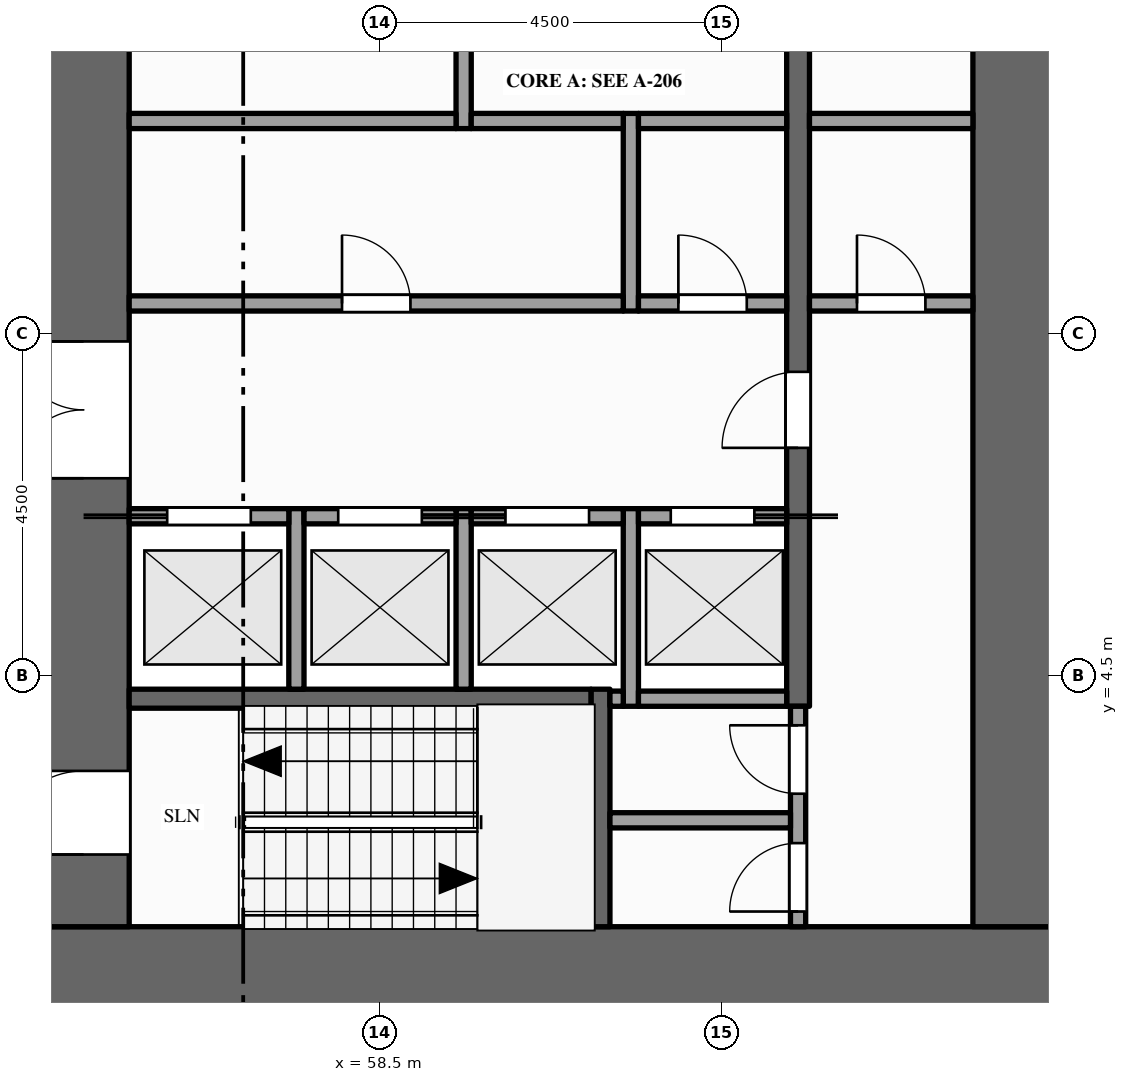
"""IFC4 building model, lengths in metres.
Left out: names, types, materials, properties, quantities, classifications, styles, units other than length and angle.
Written with IfcOpenShell. Run it as: python <this file> out.ifc"""

import sys

from ifc_helpers import new_model, si_unit, direction, frame, frame_2d, origin, place, context, subcontext, project, spatial, rectangle, extrude, element, fill, save


model = new_model("IFC4")
c1 = context("Model", 3, precision=1e-05, world=origin(), true_north=direction((0.0, 1.0)))
c2 = subcontext(c1, "Body", "Model", "MODEL_VIEW")
j1 = project(units=[si_unit("LENGTHUNIT", "METRE"), si_unit("PLANEANGLEUNIT", "RADIAN")], contexts=[c1])
p1 = place(None, origin())
s1 = spatial("IfcSite", under=j1, at=p1, CompositionType="ELEMENT")
p2 = place(p1, origin())
s2 = spatial("IfcBuilding", under=s1, at=p2, CompositionType="ELEMENT")
p3 = place(p2, frame((0.0, 0.0, 29.0)))
s3 = spatial("IfcBuildingStorey", under=s2, at=p3, CompositionType="ELEMENT", Elevation=29.0)
p4 = place(p3, frame((67.5, 0.6, -0.15), z_axis=(0.0, 0.0, 1.0), x_axis=(-1.0, 0.0, 0.0)))
e1 = element("IfcWall", 1, at=p4, inside=s3, PredefinedType="SHEAR", context=c2, shape_type="SweptSolid", body=[
    extrude(rectangle(XDim=13.5, YDim=1.2, at=frame_2d((6.75, 0.0))), origin(), (0.0, 0.0, 1.0), 4.0),
])
p5 = place(p3, frame((54.6, 1.2, -0.15), z_axis=(0.0, 0.0, 1.0), x_axis=(0.0, 1.0, 0.0)))
e2 = element("IfcWall", 2, at=p5, inside=s3, PredefinedType="SHEAR", context=c2, shape_type="SweptSolid", body=[
    extrude(rectangle(XDim=20.1, YDim=1.2, at=frame_2d((10.05, 0.0))), origin(), (0.0, 0.0, 1.0), 4.0),
])
p6 = place(p5, frame((5.9, 0.0, 0.15)))
e3 = element("IfcOpeningElement", 3, at=p6, cuts=e2, PredefinedType="OPENING", context=c2, shape_type="SweptSolid", body=[
    extrude(rectangle(XDim=1.8, YDim=2.1, at=frame_2d((0.9, 1.05))), frame((0.0, 0.61, 0.0), z_axis=(0.0, -1.0, 0.0), x_axis=(1.0, 0.0, 0.0)), (0.0, 0.0, 1.0), 1.22),
])
p7 = place(p5, frame((11.95, 0.0, 0.15)))
e4 = element("IfcOpeningElement", 4, at=p7, cuts=e2, PredefinedType="OPENING", context=c2, shape_type="SweptSolid", body=[
    extrude(rectangle(XDim=1.1, YDim=2.1, at=frame_2d((0.55, 1.05))), frame((0.0, 0.61, 0.0), z_axis=(0.0, -1.0, 0.0), x_axis=(1.0, 0.0, 0.0)), (0.0, 0.0, 1.0), 1.22),
])
p8 = place(p5, frame((0.95, 0.0, 0.15)))
e5 = element("IfcOpeningElement", 5, at=p8, cuts=e2, PredefinedType="OPENING", context=c2, shape_type="SweptSolid", body=[
    extrude(rectangle(XDim=1.1, YDim=2.1, at=frame_2d((0.55, 1.05))), frame((0.0, 0.61, 0.0), z_axis=(0.0, -1.0, 0.0), x_axis=(1.0, 0.0, 0.0)), (0.0, 0.0, 1.0), 1.22),
])
p9 = place(p5, frame((18.15, 0.0, 0.15)))
e6 = element("IfcOpeningElement", 6, at=p9, cuts=e2, PredefinedType="OPENING", context=c2, shape_type="SweptSolid", body=[
    extrude(rectangle(XDim=1.1, YDim=2.1, at=frame_2d((0.55, 1.05))), frame((0.0, 0.61, 0.0), z_axis=(0.0, -1.0, 0.0), x_axis=(1.0, 0.0, 0.0)), (0.0, 0.0, 1.0), 1.22),
])
p10 = place(p3, frame((66.9, 1.2, -0.15), z_axis=(0.0, 0.0, 1.0), x_axis=(0.0, 1.0, 0.0)))
e7 = element("IfcWall", 7, at=p10, inside=s3, PredefinedType="SHEAR", context=c2, shape_type="SweptSolid", body=[
    extrude(rectangle(XDim=20.1, YDim=1.2, at=frame_2d((10.05, 0.0))), origin(), (0.0, 0.0, 1.0), 4.0),
])
for number, where, z_axis, x_axis in (
    (8, (57.4, 4.325, 0.0), (0.0, 0.0, 1.0), (0.0, 1.0, 0.0)),
    (9, (59.6, 4.325, 0.0), (0.0, 0.0, 1.0), (0.0, 1.0, 0.0)),
):
    element("IfcWall", number, at=place(p3, frame(where, z_axis=z_axis, x_axis=x_axis)), inside=s3, PredefinedType="SOLIDWALL", context=c2, shape_type="SweptSolid", body=[
        extrude(rectangle(XDim=2.375, YDim=0.2, at=frame_2d((1.188, 0.0))), origin(), (0.0, 0.0, 1.0), 3.85),
    ])
p11 = place(p3, frame((59.6, 11.7, 0.0), z_axis=(0.0, 0.0, 1.0), x_axis=(0.0, 1.0, 0.0)))
e10 = element("IfcWall", 10, at=p11, inside=s3, PredefinedType="PARTITIONING", context=c2, shape_type="SweptSolid", body=[
    extrude(rectangle(XDim=3.8, YDim=0.2, at=frame_2d((1.9, 0.0))), origin(), (0.0, 0.0, 1.0), 3.85),
])
p12 = place(p11, frame((1.5, 0.0, 0.0)))
e11 = element("IfcOpeningElement", 11, at=p12, cuts=e10, PredefinedType="OPENING", context=c2, shape_type="SweptSolid", body=[
    extrude(rectangle(XDim=1.0, YDim=2.1, at=frame_2d((0.5, 1.05))), frame((0.0, 0.11, 0.0), z_axis=(0.0, -1.0, 0.0), x_axis=(1.0, 0.0, 0.0)), (0.0, 0.0, 1.0), 0.22),
])
p13 = place(p3, frame((61.4, 1.2, 0.0), z_axis=(0.0, 0.0, 1.0), x_axis=(0.0, 1.0, 0.0)))
e12 = element("IfcWall", 12, at=p13, inside=s3, PredefinedType="SHEAR", context=c2, shape_type="SweptSolid", body=[
    extrude(rectangle(XDim=3.125, YDim=0.25, at=frame_2d((1.562, 0.0))), origin(), (0.0, 0.0, 1.0), 3.85),
])
p14 = place(p3, frame((61.8, 4.1, 0.0), z_axis=(0.0, 0.0, 1.0), x_axis=(0.0, 1.0, 0.0)))
e13 = element("IfcWall", 13, at=p14, inside=s3, PredefinedType="SOLIDWALL", context=c2, shape_type="SweptSolid", body=[
    extrude(rectangle(XDim=2.6, YDim=0.2, at=frame_2d((1.3, 0.0))), origin(), (0.0, 0.0, 1.0), 3.85),
])
p15 = place(p3, frame((61.8, 9.3, 0.0), z_axis=(0.0, 0.0, 1.0), x_axis=(0.0, 1.0, 0.0)))
e14 = element("IfcWall", 14, at=p15, inside=s3, PredefinedType="PARTITIONING", context=c2, shape_type="SweptSolid", body=[
    extrude(rectangle(XDim=2.6, YDim=0.2, at=frame_2d((1.3, 0.0))), origin(), (0.0, 0.0, 1.0), 3.85),
])
p16 = place(p3, frame((64.0, 1.2, 0.0), z_axis=(0.0, 0.0, 1.0), x_axis=(0.0, 1.0, 0.0)))
e15 = element("IfcWall", 15, at=p16, inside=s3, PredefinedType="PARTITIONING", context=c2, shape_type="SweptSolid", body=[
    extrude(rectangle(XDim=2.9, YDim=0.2, at=frame_2d((1.45, 0.0))), origin(), (0.0, 0.0, 1.0), 3.85),
])
p17 = place(p16, frame((0.2, 0.0, 0.0)))
e16 = element("IfcOpeningElement", 16, at=p17, cuts=e15, PredefinedType="OPENING", context=c2, shape_type="SweptSolid", body=[
    extrude(rectangle(XDim=0.9, YDim=2.1, at=frame_2d((0.45, 1.05))), frame((0.0, 0.11, 0.0), z_axis=(0.0, -1.0, 0.0), x_axis=(1.0, 0.0, 0.0)), (0.0, 0.0, 1.0), 0.22),
])
p18 = place(p16, frame((1.75, 0.0, 0.0)))
e17 = element("IfcOpeningElement", 17, at=p18, cuts=e15, PredefinedType="OPENING", context=c2, shape_type="SweptSolid", body=[
    extrude(rectangle(XDim=0.9, YDim=2.1, at=frame_2d((0.45, 1.05))), frame((0.0, 0.11, 0.0), z_axis=(0.0, -1.0, 0.0), x_axis=(1.0, 0.0, 0.0)), (0.0, 0.0, 1.0), 0.22),
])
p19 = place(p3, frame((64.0, 4.1, 0.0), z_axis=(0.0, 0.0, 1.0), x_axis=(0.0, 1.0, 0.0)))
e18 = element("IfcWall", 18, at=p19, inside=s3, PredefinedType="SHEAR", context=c2, shape_type="SweptSolid", body=[
    extrude(rectangle(XDim=14.5, YDim=0.3, at=frame_2d((7.25, 0.0))), origin(), (0.0, 0.0, 1.0), 3.85),
])
p20 = place(p19, frame((3.4, 0.0, 0.0)))
e19 = element("IfcOpeningElement", 19, at=p20, cuts=e18, PredefinedType="OPENING", context=c2, shape_type="SweptSolid", body=[
    extrude(rectangle(XDim=1.0, YDim=2.1, at=frame_2d((0.5, 1.05))), frame((0.0, 0.16, 0.0), z_axis=(0.0, -1.0, 0.0), x_axis=(1.0, 0.0, 0.0)), (0.0, 0.0, 1.0), 0.32),
])
p21 = place(p19, frame((9.1, 0.0, 0.0)))
e20 = element("IfcOpeningElement", 20, at=p21, cuts=e18, PredefinedType="OPENING", context=c2, shape_type="SweptSolid", body=[
    extrude(rectangle(XDim=1.0, YDim=2.1, at=frame_2d((0.5, 1.05))), frame((0.0, 0.16, 0.0), z_axis=(0.0, -1.0, 0.0), x_axis=(1.0, 0.0, 0.0)), (0.0, 0.0, 1.0), 0.32),
])
p22 = place(p3, frame((61.525, 2.6, 0.0), z_axis=(0.0, 0.0, 1.0), x_axis=(1.0, 0.0, 0.0)))
e21 = element("IfcWall", 21, at=p22, inside=s3, PredefinedType="PARTITIONING", context=c2, shape_type="SweptSolid", body=[
    extrude(rectangle(XDim=2.375, YDim=0.2, at=frame_2d((1.188, 0.0))), origin(), (0.0, 0.0, 1.0), 3.85),
])
p23 = place(p3, frame((55.2, 4.2, 0.0), z_axis=(0.0, 0.0, 1.0), x_axis=(1.0, 0.0, 0.0)))
e22 = element("IfcWall", 22, at=p23, inside=s3, PredefinedType="SHEAR", context=c2, shape_type="SweptSolid", body=[
    extrude(rectangle(XDim=6.075, YDim=0.25, at=frame_2d((3.038, 0.0))), origin(), (0.0, 0.0, 1.0), 3.85),
])
p24 = place(p3, frame((61.525, 4.2, 0.0), z_axis=(0.0, 0.0, 1.0), x_axis=(1.0, 0.0, 0.0)))
e23 = element("IfcWall", 23, at=p24, inside=s3, PredefinedType="SOLIDWALL", context=c2, shape_type="SweptSolid", body=[
    extrude(rectangle(XDim=0.175, YDim=0.2, at=frame_2d((0.087, 0.0))), origin(), (0.0, 0.0, 1.0), 3.85),
])
p25 = place(p3, frame((61.9, 4.2, 0.0), z_axis=(0.0, 0.0, 1.0), x_axis=(1.0, 0.0, 0.0)))
e24 = element("IfcWall", 24, at=p25, inside=s3, PredefinedType="SOLIDWALL", context=c2, shape_type="SweptSolid", body=[
    extrude(rectangle(XDim=1.95, YDim=0.2, at=frame_2d((0.975, 0.0))), origin(), (0.0, 0.0, 1.0), 3.85),
])
p26 = place(p3, frame((55.2, 6.6, 0.0), z_axis=(0.0, 0.0, 1.0), x_axis=(1.0, 0.0, 0.0)))
e25 = element("IfcWall", 25, at=p26, inside=s3, PredefinedType="SOLIDWALL", context=c2, shape_type="SweptSolid", body=[
    extrude(rectangle(XDim=2.1, YDim=0.2, at=frame_2d((1.05, 0.0))), origin(), (0.0, 0.0, 1.0), 3.85),
])
p27 = place(p26, frame((0.5, 0.0, 0.012)))
e26 = element("IfcOpeningElement", 26, at=p27, cuts=e25, PredefinedType="OPENING", context=c2, shape_type="SweptSolid", body=[
    extrude(rectangle(XDim=1.1, YDim=2.1, at=frame_2d((0.55, 1.05))), frame((0.0, 0.11, 0.0), z_axis=(0.0, -1.0, 0.0), x_axis=(1.0, 0.0, 0.0)), (0.0, 0.0, 1.0), 0.22),
])
p28 = place(p3, frame((57.5, 6.6, 0.0), z_axis=(0.0, 0.0, 1.0), x_axis=(1.0, 0.0, 0.0)))
e27 = element("IfcWall", 27, at=p28, inside=s3, PredefinedType="SOLIDWALL", context=c2, shape_type="SweptSolid", body=[
    extrude(rectangle(XDim=2.0, YDim=0.2, at=frame_2d((1.0, 0.0))), origin(), (0.0, 0.0, 1.0), 3.85),
])
p29 = place(p28, frame((0.45, 0.0, 0.012)))
e28 = element("IfcOpeningElement", 28, at=p29, cuts=e27, PredefinedType="OPENING", context=c2, shape_type="SweptSolid", body=[
    extrude(rectangle(XDim=1.1, YDim=2.1, at=frame_2d((0.55, 1.05))), frame((0.0, 0.11, 0.0), z_axis=(0.0, -1.0, 0.0), x_axis=(1.0, 0.0, 0.0)), (0.0, 0.0, 1.0), 0.22),
])
p30 = place(p3, frame((59.7, 6.6, 0.0), z_axis=(0.0, 0.0, 1.0), x_axis=(1.0, 0.0, 0.0)))
e29 = element("IfcWall", 29, at=p30, inside=s3, PredefinedType="SOLIDWALL", context=c2, shape_type="SweptSolid", body=[
    extrude(rectangle(XDim=2.0, YDim=0.2, at=frame_2d((1.0, 0.0))), origin(), (0.0, 0.0, 1.0), 3.85),
])
p31 = place(p30, frame((0.45, 0.0, 0.012)))
e30 = element("IfcOpeningElement", 30, at=p31, cuts=e29, PredefinedType="OPENING", context=c2, shape_type="SweptSolid", body=[
    extrude(rectangle(XDim=1.1, YDim=2.1, at=frame_2d((0.55, 1.05))), frame((0.0, 0.11, 0.0), z_axis=(0.0, -1.0, 0.0), x_axis=(1.0, 0.0, 0.0)), (0.0, 0.0, 1.0), 0.22),
])
p32 = place(p3, frame((61.9, 6.6, 0.0), z_axis=(0.0, 0.0, 1.0), x_axis=(1.0, 0.0, 0.0)))
e31 = element("IfcWall", 31, at=p32, inside=s3, PredefinedType="SOLIDWALL", context=c2, shape_type="SweptSolid", body=[
    extrude(rectangle(XDim=1.95, YDim=0.2, at=frame_2d((0.975, 0.0))), origin(), (0.0, 0.0, 1.0), 3.85),
])
p33 = place(p32, frame((0.425, 0.0, 0.012)))
e32 = element("IfcOpeningElement", 32, at=p33, cuts=e31, PredefinedType="OPENING", context=c2, shape_type="SweptSolid", body=[
    extrude(rectangle(XDim=1.1, YDim=2.1, at=frame_2d((0.55, 1.05))), frame((0.0, 0.11, 0.0), z_axis=(0.0, -1.0, 0.0), x_axis=(1.0, 0.0, 0.0)), (0.0, 0.0, 1.0), 0.22),
])
p34 = place(p3, frame((55.2, 9.4, 0.0), z_axis=(0.0, 0.0, 1.0), x_axis=(1.0, 0.0, 0.0)))
e33 = element("IfcWall", 33, at=p34, inside=s3, PredefinedType="PARTITIONING", context=c2, shape_type="SweptSolid", body=[
    extrude(rectangle(XDim=6.5, YDim=0.2, at=frame_2d((3.25, 0.0))), origin(), (0.0, 0.0, 1.0), 3.85),
])
p35 = place(p34, frame((2.8, 0.0, 0.0)))
e34 = element("IfcOpeningElement", 34, at=p35, cuts=e33, PredefinedType="OPENING", context=c2, shape_type="SweptSolid", body=[
    extrude(rectangle(XDim=0.9, YDim=2.1, at=frame_2d((0.45, 1.05))), frame((0.0, 0.11, 0.0), z_axis=(0.0, -1.0, 0.0), x_axis=(1.0, 0.0, 0.0)), (0.0, 0.0, 1.0), 0.22),
])
p36 = place(p3, frame((61.9, 9.4, 0.0), z_axis=(0.0, 0.0, 1.0), x_axis=(1.0, 0.0, 0.0)))
e35 = element("IfcWall", 35, at=p36, inside=s3, PredefinedType="PARTITIONING", context=c2, shape_type="SweptSolid", body=[
    extrude(rectangle(XDim=1.95, YDim=0.2, at=frame_2d((0.975, 0.0))), origin(), (0.0, 0.0, 1.0), 3.85),
])
p37 = place(p36, frame((0.525, 0.0, 0.0)))
e36 = element("IfcOpeningElement", 36, at=p37, cuts=e35, PredefinedType="OPENING", context=c2, shape_type="SweptSolid", body=[
    extrude(rectangle(XDim=0.9, YDim=2.1, at=frame_2d((0.45, 1.05))), frame((0.0, 0.11, 0.0), z_axis=(0.0, -1.0, 0.0), x_axis=(1.0, 0.0, 0.0)), (0.0, 0.0, 1.0), 0.22),
])
p38 = place(p3, frame((64.15, 9.4, 0.0), z_axis=(0.0, 0.0, 1.0), x_axis=(1.0, 0.0, 0.0)))
e37 = element("IfcWall", 37, at=p38, inside=s3, PredefinedType="PARTITIONING", context=c2, shape_type="SweptSolid", body=[
    extrude(rectangle(XDim=2.15, YDim=0.2, at=frame_2d((1.075, 0.0))), origin(), (0.0, 0.0, 1.0), 3.85),
])
p39 = place(p38, frame((0.625, 0.0, 0.0)))
e38 = element("IfcOpeningElement", 38, at=p39, cuts=e37, PredefinedType="OPENING", context=c2, shape_type="SweptSolid", body=[
    extrude(rectangle(XDim=0.9, YDim=2.1, at=frame_2d((0.45, 1.05))), frame((0.0, 0.11, 0.0), z_axis=(0.0, -1.0, 0.0), x_axis=(1.0, 0.0, 0.0)), (0.0, 0.0, 1.0), 0.22),
])
p40 = place(p3, frame((55.2, 11.8, 0.0), z_axis=(0.0, 0.0, 1.0), x_axis=(1.0, 0.0, 0.0)))
e39 = element("IfcWall", 39, at=p40, inside=s3, PredefinedType="PARTITIONING", context=c2, shape_type="SweptSolid", body=[
    extrude(rectangle(XDim=4.3, YDim=0.2, at=frame_2d((2.15, 0.0))), origin(), (0.0, 0.0, 1.0), 3.85),
])
p41 = place(p3, frame((59.7, 11.8, 0.0), z_axis=(0.0, 0.0, 1.0), x_axis=(1.0, 0.0, 0.0)))
e40 = element("IfcWall", 40, at=p41, inside=s3, PredefinedType="PARTITIONING", context=c2, shape_type="SweptSolid", body=[
    extrude(rectangle(XDim=2.0, YDim=0.2, at=frame_2d((1.0, 0.0))), origin(), (0.0, 0.0, 1.0), 3.85),
])
p42 = place(p3, frame((61.9, 11.8, 0.0), z_axis=(0.0, 0.0, 1.0), x_axis=(1.0, 0.0, 0.0)))
e41 = element("IfcWall", 41, at=p42, inside=s3, PredefinedType="PARTITIONING", context=c2, shape_type="SweptSolid", body=[
    extrude(rectangle(XDim=1.95, YDim=0.2, at=frame_2d((0.975, 0.0))), origin(), (0.0, 0.0, 1.0), 3.85),
])
p43 = place(p3, frame((64.15, 11.8, 0.0), z_axis=(0.0, 0.0, 1.0), x_axis=(1.0, 0.0, 0.0)))
e42 = element("IfcWall", 42, at=p43, inside=s3, PredefinedType="PARTITIONING", context=c2, shape_type="SweptSolid", body=[
    extrude(rectangle(XDim=2.15, YDim=0.2, at=frame_2d((1.075, 0.0))), origin(), (0.0, 0.0, 1.0), 3.85),
])
p44 = place(p27, origin())
e43 = element("IfcDoor", 43, at=p44, inside=s3, OperationType="SLIDING_TO_LEFT", PredefinedType="DOOR", context=c2, shape_type="SweptSolid", body=[
    extrude(rectangle(XDim=1.1, YDim=2.1, at=frame_2d((0.55, 1.05))), frame((0.0, 0.025, 0.0), z_axis=(0.0, -1.0, 0.0), x_axis=(1.0, 0.0, 0.0)), (0.0, 0.0, 1.0), 0.05),
])
fill(e26, e43)
p45 = place(p29, origin())
e44 = element("IfcDoor", 44, at=p45, inside=s3, OperationType="SLIDING_TO_RIGHT", PredefinedType="DOOR", context=c2, shape_type="SweptSolid", body=[
    extrude(rectangle(XDim=1.1, YDim=2.1, at=frame_2d((0.55, 1.05))), frame((0.0, 0.025, 0.0), z_axis=(0.0, -1.0, 0.0), x_axis=(1.0, 0.0, 0.0)), (0.0, 0.0, 1.0), 0.05),
])
fill(e28, e44)
p46 = place(p31, origin())
e45 = element("IfcDoor", 45, at=p46, inside=s3, OperationType="SLIDING_TO_LEFT", PredefinedType="DOOR", context=c2, shape_type="SweptSolid", body=[
    extrude(rectangle(XDim=1.1, YDim=2.1, at=frame_2d((0.55, 1.05))), frame((0.0, 0.025, 0.0), z_axis=(0.0, -1.0, 0.0), x_axis=(1.0, 0.0, 0.0)), (0.0, 0.0, 1.0), 0.05),
])
fill(e30, e45)
p47 = place(p33, origin())
e46 = element("IfcDoor", 46, at=p47, inside=s3, OperationType="SLIDING_TO_RIGHT", PredefinedType="DOOR", context=c2, shape_type="SweptSolid", body=[
    extrude(rectangle(XDim=1.1, YDim=2.1, at=frame_2d((0.55, 1.05))), frame((0.0, 0.025, 0.0), z_axis=(0.0, -1.0, 0.0), x_axis=(1.0, 0.0, 0.0)), (0.0, 0.0, 1.0), 0.05),
])
fill(e32, e46)
p48 = place(p6, origin())
e47 = element("IfcDoor", 47, at=p48, inside=s3, OperationType="DOUBLE_DOOR_SINGLE_SWING", PredefinedType="DOOR", context=c2, shape_type="SweptSolid", body=[
    extrude(rectangle(XDim=1.8, YDim=2.1, at=frame_2d((0.9, 1.05))), frame((0.0, 0.025, 0.0), z_axis=(0.0, -1.0, 0.0), x_axis=(1.0, 0.0, 0.0)), (0.0, 0.0, 1.0), 0.05),
])
fill(e3, e47)
p49 = place(p20, origin())
e48 = element("IfcDoor", 48, at=p49, inside=s3, OperationType="SINGLE_SWING_LEFT", PredefinedType="DOOR", context=c2, shape_type="SweptSolid", body=[
    extrude(rectangle(XDim=1.0, YDim=2.1, at=frame_2d((0.5, 1.05))), frame((0.0, 0.025, 0.0), z_axis=(0.0, -1.0, 0.0), x_axis=(1.0, 0.0, 0.0)), (0.0, 0.0, 1.0), 0.05),
])
fill(e19, e48)
p50 = place(p39, origin())
e49 = element("IfcDoor", 49, at=p50, inside=s3, OperationType="SINGLE_SWING_LEFT", PredefinedType="DOOR", context=c2, shape_type="SweptSolid", body=[
    extrude(rectangle(XDim=0.9, YDim=2.1, at=frame_2d((0.45, 1.05))), frame((0.0, 0.025, 0.0), z_axis=(0.0, -1.0, 0.0), x_axis=(1.0, 0.0, 0.0)), (0.0, 0.0, 1.0), 0.05),
])
fill(e38, e49)
p51 = place(p8, origin())
e50 = element("IfcDoor", 50, at=p51, inside=s3, OperationType="SINGLE_SWING_LEFT", PredefinedType="DOOR", context=c2, shape_type="SweptSolid", body=[
    extrude(rectangle(XDim=1.1, YDim=2.1, at=frame_2d((0.55, 1.05))), frame((0.0, 0.025, 0.0), z_axis=(0.0, -1.0, 0.0), x_axis=(1.0, 0.0, 0.0)), (0.0, 0.0, 1.0), 0.05),
])
fill(e5, e50)
p52 = place(p17, origin())
e51 = element("IfcDoor", 51, at=p52, inside=s3, OperationType="SINGLE_SWING_LEFT", PredefinedType="DOOR", context=c2, shape_type="SweptSolid", body=[
    extrude(rectangle(XDim=0.9, YDim=2.1, at=frame_2d((0.45, 1.05))), frame((0.0, 0.025, 0.0), z_axis=(0.0, -1.0, 0.0), x_axis=(1.0, 0.0, 0.0)), (0.0, 0.0, 1.0), 0.05),
])
fill(e16, e51)
p53 = place(p18, origin())
e52 = element("IfcDoor", 52, at=p53, inside=s3, OperationType="SINGLE_SWING_RIGHT", PredefinedType="DOOR", context=c2, shape_type="SweptSolid", body=[
    extrude(rectangle(XDim=0.9, YDim=2.1, at=frame_2d((0.45, 1.05))), frame((0.0, 0.025, 0.0), z_axis=(0.0, -1.0, 0.0), x_axis=(1.0, 0.0, 0.0)), (0.0, 0.0, 1.0), 0.05),
])
fill(e17, e52)
p54 = place(p35, origin())
e53 = element("IfcDoor", 53, at=p54, inside=s3, OperationType="SINGLE_SWING_LEFT", PredefinedType="DOOR", context=c2, shape_type="SweptSolid", body=[
    extrude(rectangle(XDim=0.9, YDim=2.1, at=frame_2d((0.45, 1.05))), frame((0.0, 0.025, 0.0), z_axis=(0.0, -1.0, 0.0), x_axis=(1.0, 0.0, 0.0)), (0.0, 0.0, 1.0), 0.05),
])
fill(e34, e53)
p55 = place(p37, origin())
e54 = element("IfcDoor", 54, at=p55, inside=s3, OperationType="SINGLE_SWING_LEFT", PredefinedType="DOOR", context=c2, shape_type="SweptSolid", body=[
    extrude(rectangle(XDim=0.9, YDim=2.1, at=frame_2d((0.45, 1.05))), frame((0.0, 0.025, 0.0), z_axis=(0.0, -1.0, 0.0), x_axis=(1.0, 0.0, 0.0)), (0.0, 0.0, 1.0), 0.05),
])
fill(e36, e54)
save(model, sys.argv[1])
